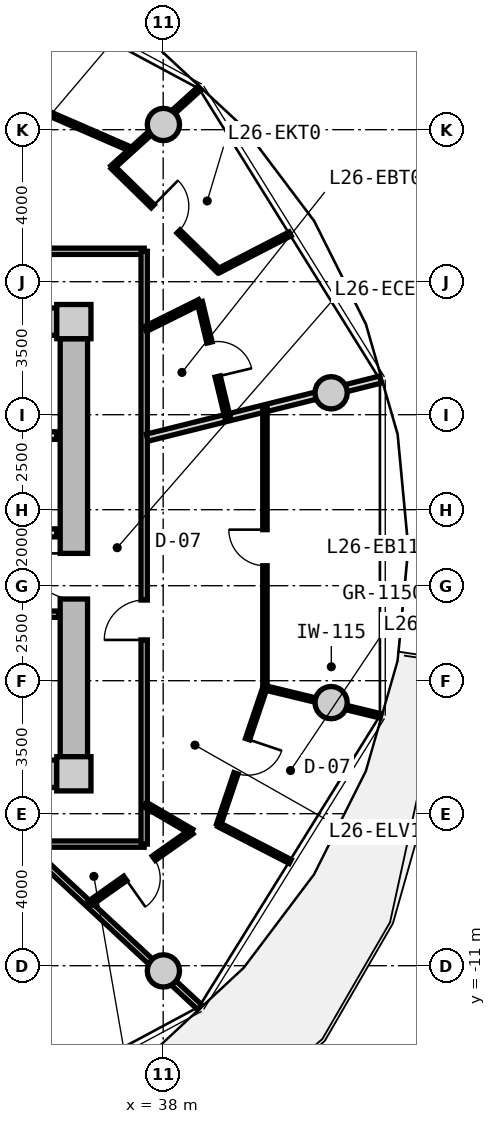
"""IFC4 building model, lengths in metres.
Left out: names, types, materials, properties, quantities, classifications, styles, units other than length and angle.
Written with IfcOpenShell. Run it as: python <this file> out.ifc"""

import sys

from ifc_helpers import new_model, si_unit, direction, frame, frame_2d, origin, origin_2d, place, context, subcontext, project, spatial, rectangle, circle, extrude, source, transform, mapped, element, fill, save


model = new_model("IFC4")
c1 = context("Model", 3, precision=1e-05, world=origin(), true_north=direction((0.0, 1.0)))
c2 = subcontext(c1, "Body", "Model", "MODEL_VIEW")
j1 = project(units=[si_unit("LENGTHUNIT", "METRE"), si_unit("PLANEANGLEUNIT", "RADIAN")], contexts=[c1])
p1 = place(None, origin())
s1 = spatial("IfcSite", under=j1, at=p1, CompositionType="ELEMENT")
p2 = place(p1, origin())
s2 = spatial("IfcBuilding", under=s1, at=p2, CompositionType="ELEMENT")
p3 = place(p2, frame((0.0, 0.0, 87.1)))
s3 = spatial("IfcBuildingStorey", under=s2, at=p3, CompositionType="ELEMENT", Elevation=87.1)
m1 = source(origin(), c2, "Body", "SweptSolid", [
    extrude(rectangle(XDim=0.9, YDim=0.9, at=origin_2d()), origin(), (0.0, 0.0, 1.0), 3.05),
])
for number, where, z_axis, x_axis in (
    (1, (35.65, -5.95, 0.0), (0.0, 0.0, 1.0), (1.0, 0.0, 0.0)),
    (2, (35.65, 5.95, 0.0), (0.0, 0.0, 1.0), (1.0, 0.0, 0.0)),
):
    element("IfcColumn", number, at=place(p3, frame(where, z_axis=z_axis, x_axis=x_axis)), inside=s3, PredefinedType="COLUMN", context=c2, shape_type="MappedRepresentation", body=[
        mapped(m1, transform((0.0, 0.0, 0.0), x_axis=(1.0, 0.0, 0.0), y_axis=(0.0, 1.0, 0.0), z_axis=(0.0, 0.0, 1.0), scale=1.0)),
    ])
m2 = source(origin(), c2, "Body", "SweptSolid", [
    extrude(rectangle(XDim=14.4, YDim=0.72, at=frame_2d((7.2, 0.0))), origin(), (0.0, 0.0, 1.0), 2.79),
])
for number, where, z_axis, x_axis in (
    (3, (20.8, 5.95, 0.0), (0.0, 0.0, 1.0), (1.0, 0.0, 0.0)),
    (4, (35.2, -5.95, 0.0), (0.0, 0.0, 1.0), (-1.0, 0.0, 0.0)),
):
    element("IfcWall", number, at=place(p3, frame(where, z_axis=z_axis, x_axis=x_axis)), inside=s3, PredefinedType="SHEAR", context=c2, shape_type="MappedRepresentation", body=[
        mapped(m2, transform((0.0, 0.0, 0.0), x_axis=(1.0, 0.0, 0.0), y_axis=(0.0, 1.0, 0.0), z_axis=(0.0, 0.0, 1.0), scale=1.0)),
    ])
m3 = source(origin(), c2, "Body", "SweptSolid", [
    extrude(rectangle(XDim=11.0, YDim=0.72, at=frame_2d((5.5, 0.0))), origin(), (0.0, 0.0, 1.0), 2.79),
])
p4 = place(p3, frame((35.65, 5.5, 0.0), z_axis=(0.0, 0.0, 1.0), x_axis=(0.0, -1.0, 0.0)))
e5 = element("IfcWall", 5, at=p4, inside=s3, PredefinedType="SHEAR", context=c2, shape_type="MappedRepresentation", body=[
    mapped(m3, transform((0.0, 0.0, 0.0), x_axis=(1.0, 0.0, 0.0), y_axis=(0.0, 1.0, 0.0), z_axis=(0.0, 0.0, 1.0), scale=1.0)),
])
p5 = place(p4, frame((5.65, 0.0, 0.0)))
e6 = element("IfcOpeningElement", 6, at=p5, cuts=e5, PredefinedType="OPENING", context=c2, shape_type="SweptSolid", body=[
    extrude(rectangle(XDim=1.2, YDim=2.15, at=frame_2d((0.6, 1.075))), frame((0.0, 0.37, 0.0), z_axis=(0.0, -1.0, 0.0), x_axis=(1.0, 0.0, 0.0)), (0.0, 0.0, 1.0), 0.74),
])
m4 = source(origin(), c2, "Body", "SweptSolid", [
    extrude(circle(Radius=0.425, at=origin_2d()), origin(), (0.0, 0.0, 1.0), 3.05),
])
for number, where, z_axis, x_axis in (
    (7, (42.419, 4.076, 0.0), (0.0, 0.0, 1.0), (1.0, 0.0, 0.0)),
    (8, (38.006, 11.137, 0.0), (0.0, 0.0, 1.0), (1.0, 0.0, 0.0)),
    (9, (38.006, -11.137, 0.0), (0.0, 0.0, 1.0), (1.0, 0.0, 0.0)),
    (10, (42.419, -4.076, 0.0), (0.0, 0.0, 1.0), (1.0, 0.0, 0.0)),
):
    element("IfcColumn", number, at=place(p3, frame(where, z_axis=z_axis, x_axis=x_axis)), inside=s3, PredefinedType="COLUMN", context=c2, shape_type="MappedRepresentation", body=[
        mapped(m4, transform((0.0, 0.0, 0.0), x_axis=(1.0, 0.0, 0.0), y_axis=(0.0, 1.0, 0.0), z_axis=(0.0, 0.0, 1.0), scale=1.0)),
    ])
m5 = source(origin(), c2, "Body", "SweptSolid", [
    extrude(rectangle(XDim=3.2, YDim=0.2, at=frame_2d((1.6, 0.0))), origin(), (0.0, 0.0, 1.0), 2.775),
])
p6 = place(p3, frame((32.0, 2.95, 0.0), z_axis=(0.0, 0.0, 1.0), x_axis=(1.0, 0.0, 0.0)))
e11 = element("IfcWall", 11, at=p6, inside=s3, PredefinedType="PARTITIONING", context=c2, shape_type="MappedRepresentation", body=[
    mapped(m5, transform((0.0, 0.0, 0.0), x_axis=(1.0, 0.0, 0.0), y_axis=(0.0, 1.0, 0.0), z_axis=(0.0, 0.0, 1.0), scale=1.0)),
])
m6 = source(origin(), c2, "Body", "SweptSolid", [
    extrude(rectangle(XDim=6.66, YDim=0.21, at=frame_2d((3.33, 0.0))), origin(), (0.0, 0.0, 1.0), 2.775),
])
p7 = place(p3, frame((28.54, 0.39, 0.0), z_axis=(0.0, 0.0, 1.0), x_axis=(1.0, 0.0, 0.0)))
e12 = element("IfcWall", 12, at=p7, inside=s3, PredefinedType="PARTITIONING", context=c2, shape_type="MappedRepresentation", body=[
    mapped(m6, transform((0.0, 0.0, 0.0), x_axis=(1.0, 0.0, 0.0), y_axis=(0.0, 1.0, 0.0), z_axis=(0.0, 0.0, 1.0), scale=1.0)),
])
p8 = place(p7, frame((1.0, 0.0, 0.0)))
e13 = element("IfcOpeningElement", 13, at=p8, cuts=e12, PredefinedType="OPENING", context=c2, shape_type="SweptSolid", body=[
    extrude(rectangle(XDim=1.2, YDim=2.15, at=frame_2d((0.6, 1.075))), frame((0.0, 0.115, 0.0), z_axis=(0.0, -1.0, 0.0), x_axis=(1.0, 0.0, 0.0)), (0.0, 0.0, 1.0), 0.23),
])
m7 = source(origin(), c2, "Body", "SweptSolid", [
    extrude(rectangle(XDim=2.7, YDim=0.165, at=frame_2d((1.35, 0.0))), origin(), (0.0, 0.0, 1.0), 2.775),
])
p9 = place(p3, frame((32.55, -1.75, 0.0), z_axis=(0.0, 0.0, 1.0), x_axis=(1.0, 0.0, 0.0)))
e14 = element("IfcWall", 14, at=p9, inside=s3, PredefinedType="PARTITIONING", context=c2, shape_type="MappedRepresentation", body=[
    mapped(m7, transform((0.0, 0.0, 0.0), x_axis=(1.0, 0.0, 0.0), y_axis=(0.0, 1.0, 0.0), z_axis=(0.0, 0.0, 1.0), scale=1.0)),
])
p10 = place(p9, frame((0.222, 0.0, 0.0)))
e15 = element("IfcOpeningElement", 15, at=p10, cuts=e14, PredefinedType="OPENING", context=c2, shape_type="SweptSolid", body=[
    extrude(rectangle(XDim=0.925, YDim=2.1, at=frame_2d((0.462, 1.05))), frame((0.0, 0.093, 0.0), z_axis=(0.0, -1.0, 0.0), x_axis=(1.0, 0.0, 0.0)), (0.0, 0.0, 1.0), 0.185),
])
p11 = place(p9, frame((1.522, 0.0, 0.0)))
e16 = element("IfcOpeningElement", 16, at=p11, cuts=e14, PredefinedType="OPENING", context=c2, shape_type="SweptSolid", body=[
    extrude(rectangle(XDim=0.925, YDim=2.1, at=frame_2d((0.462, 1.05))), frame((0.0, 0.093, 0.0), z_axis=(0.0, -1.0, 0.0), x_axis=(1.0, 0.0, 0.0)), (0.0, 0.0, 1.0), 0.185),
])
m8 = source(origin(), c2, "Body", "SweptSolid", [
    extrude(rectangle(XDim=9.234, YDim=0.165, at=frame_2d((4.617, 0.0))), origin(), (0.0, 0.0, 1.0), 2.775),
])
p12 = place(p3, frame((28.266, 7.8, 0.0), z_axis=(0.0, 0.0, 1.0), x_axis=(1.0, 0.0, 0.0)))
e17 = element("IfcWall", 17, at=p12, inside=s3, PredefinedType="PARTITIONING", context=c2, shape_type="MappedRepresentation", body=[
    mapped(m8, transform((0.0, 0.0, 0.0), x_axis=(1.0, 0.0, 0.0), y_axis=(0.0, 1.0, 0.0), z_axis=(0.0, 0.0, 1.0), scale=1.0)),
])
p13 = place(p12, frame((4.092, 0.0, 0.0)))
e18 = element("IfcOpeningElement", 18, at=p13, cuts=e17, PredefinedType="OPENING", context=c2, shape_type="SweptSolid", body=[
    extrude(rectangle(XDim=1.05, YDim=2.15, at=frame_2d((0.525, 1.075))), frame((0.0, 0.093, 0.0), z_axis=(0.0, -1.0, 0.0), x_axis=(1.0, 0.0, 0.0)), (0.0, 0.0, 1.0), 0.185),
])
m9 = source(origin(), c2, "Body", "SweptSolid", [
    extrude(rectangle(XDim=8.6, YDim=0.165, at=frame_2d((4.3, 0.0))), origin(), (0.0, 0.0, 1.0), 2.775),
])
p14 = place(p3, frame((37.5, -7.8, 0.0), z_axis=(0.0, 0.0, 1.0), x_axis=(-1.0, 0.0, 0.0)))
e19 = element("IfcWall", 19, at=p14, inside=s3, PredefinedType="PARTITIONING", context=c2, shape_type="MappedRepresentation", body=[
    mapped(m9, transform((0.0, 0.0, 0.0), x_axis=(1.0, 0.0, 0.0), y_axis=(0.0, 1.0, 0.0), z_axis=(0.0, 0.0, 1.0), scale=1.0)),
])
m10 = source(origin(), c2, "Body", "SweptSolid", [
    extrude(rectangle(XDim=15.6, YDim=0.165, at=frame_2d((7.8, 0.0))), origin(), (0.0, 0.0, 1.0), 2.775),
])
p15 = place(p3, frame((37.5, 7.8, 0.0), z_axis=(0.0, 0.0, 1.0), x_axis=(0.0, -1.0, 0.0)))
e20 = element("IfcWall", 20, at=p15, inside=s3, PredefinedType="PARTITIONING", context=c2, shape_type="MappedRepresentation", body=[
    mapped(m10, transform((0.0, 0.0, 0.0), x_axis=(1.0, 0.0, 0.0), y_axis=(0.0, 1.0, 0.0), z_axis=(0.0, 0.0, 1.0), scale=1.0)),
])
p16 = place(p15, frame((9.177, 0.0, 0.0)))
e21 = element("IfcOpeningElement", 21, at=p16, cuts=e20, PredefinedType="OPENING", context=c2, shape_type="SweptSolid", body=[
    extrude(rectangle(XDim=1.05, YDim=2.15, at=frame_2d((0.525, 1.075))), frame((0.0, 0.093, 0.0), z_axis=(0.0, -1.0, 0.0), x_axis=(1.0, 0.0, 0.0)), (0.0, 0.0, 1.0), 0.185),
])
m11 = source(origin(), c2, "Body", "SweptSolid", [
    extrude(rectangle(XDim=6.187, YDim=0.165, at=frame_2d((3.093, 0.0))), origin(), (0.0, 0.0, 1.0), 2.275),
])
p17 = place(p3, frame((34.429, -7.88, 0.0), z_axis=(0.0, 0.0, 1.0), x_axis=(0.732501077882, -0.680765870841, 0.0)))
e22 = element("IfcWall", 22, at=p17, inside=s3, PredefinedType="PARTITIONING", context=c2, shape_type="MappedRepresentation", body=[
    mapped(m11, transform((0.0, 0.0, 0.0), x_axis=(1.0, 0.0, 0.0), y_axis=(0.0, 1.0, 0.0), z_axis=(0.0, 0.0, 1.0), scale=1.0)),
])
m12 = source(origin(), c2, "Body", "SweptSolid", [
    extrude(rectangle(XDim=6.331, YDim=0.19, at=frame_2d((3.165, 0.0))), origin(), (0.0, 0.0, 1.0), 2.275),
])
p18 = place(p3, frame((37.58, 2.896, 0.0), z_axis=(0.0, 0.0, 1.0), x_axis=(0.97036440661, 0.241646267062, 0.0)))
e23 = element("IfcWall", 23, at=p18, inside=s3, PredefinedType="PARTITIONING", context=c2, shape_type="MappedRepresentation", body=[
    mapped(m12, transform((0.0, 0.0, 0.0), x_axis=(1.0, 0.0, 0.0), y_axis=(0.0, 1.0, 0.0), z_axis=(0.0, 0.0, 1.0), scale=1.0)),
])
m13 = source(origin(), c2, "Body", "SweptSolid", [
    extrude(rectangle(XDim=7.375, YDim=0.115, at=frame_2d((3.688, 0.0))), origin(), (0.0, 0.0, 1.0), 2.775),
])
p19 = place(p3, frame((40.678, -3.688, 0.0), z_axis=(0.0, 0.0, 1.0), x_axis=(0.0, 1.0, 0.0)))
e24 = element("IfcWall", 24, at=p19, inside=s3, PredefinedType="PARTITIONING", context=c2, shape_type="MappedRepresentation", body=[
    mapped(m13, transform((0.0, 0.0, 0.0), x_axis=(1.0, 0.0, 0.0), y_axis=(0.0, 1.0, 0.0), z_axis=(0.0, 0.0, 1.0), scale=1.0)),
])
p20 = place(p19, frame((3.213, 0.0, 0.0)))
e25 = element("IfcOpeningElement", 25, at=p20, cuts=e24, PredefinedType="OPENING", context=c2, shape_type="SweptSolid", body=[
    extrude(rectangle(XDim=0.95, YDim=2.1, at=frame_2d((0.475, 1.05))), frame((0.0, 0.067, 0.0), z_axis=(0.0, -1.0, 0.0), x_axis=(1.0, 0.0, 0.0)), (0.0, 0.0, 1.0), 0.135),
])
m14 = source(origin(), c2, "Body", "SweptSolid", [
    extrude(rectangle(XDim=3.133, YDim=0.115, at=frame_2d((1.567, 0.0))), origin(), (0.0, 0.0, 1.0), 2.275),
])
p21 = place(p3, frame((40.678, -3.688, 0.0), z_axis=(0.0, 0.0, 1.0), x_axis=(0.971863619682, -0.235544273414, 0.0)))
e26 = element("IfcWall", 26, at=p21, inside=s3, PredefinedType="PARTITIONING", context=c2, shape_type="MappedRepresentation", body=[
    mapped(m14, transform((0.0, 0.0, 0.0), x_axis=(1.0, 0.0, 0.0), y_axis=(0.0, 1.0, 0.0), z_axis=(0.0, 0.0, 1.0), scale=1.0)),
])
m15 = source(origin(), c2, "Body", "SweptSolid", [
    extrude(rectangle(XDim=1.407, YDim=0.14, at=frame_2d((0.704, 0.0))), origin(), (0.0, 0.0, 1.0), 2.775),
])
p22 = place(p3, frame((37.53, -6.762, 0.0), z_axis=(0.0, 0.0, 1.0), x_axis=(0.863539718977, -0.504280828258, 0.0)))
e27 = element("IfcWall", 27, at=p22, inside=s3, PredefinedType="PARTITIONING", context=c2, shape_type="MappedRepresentation", body=[
    mapped(m15, transform((0.0, 0.0, 0.0), x_axis=(1.0, 0.0, 0.0), y_axis=(0.0, 1.0, 0.0), z_axis=(0.0, 0.0, 1.0), scale=1.0)),
])
m16 = source(origin(), c2, "Body", "SweptSolid", [
    extrude(rectangle(XDim=3.347, YDim=0.14, at=frame_2d((1.673, 0.0))), origin(), (0.0, 0.0, 1.0), 2.775),
])
p23 = place(p3, frame((38.745, -7.472, 0.0), z_axis=(0.0, 0.0, 1.0), x_axis=(-0.81705680263, -0.576557179537, 0.0)))
e28 = element("IfcWall", 28, at=p23, inside=s3, PredefinedType="PARTITIONING", context=c2, shape_type="MappedRepresentation", body=[
    mapped(m16, transform((0.0, 0.0, 0.0), x_axis=(1.0, 0.0, 0.0), y_axis=(0.0, 1.0, 0.0), z_axis=(0.0, 0.0, 1.0), scale=1.0)),
])
p24 = place(p23, frame((1.214, 0.0, 0.0)))
e29 = element("IfcOpeningElement", 29, at=p24, cuts=e28, PredefinedType="OPENING", context=c2, shape_type="SweptSolid", body=[
    extrude(rectangle(XDim=0.92, YDim=2.1, at=frame_2d((0.46, 1.05))), frame((0.0, 0.08, 0.0), z_axis=(0.0, -1.0, 0.0), x_axis=(1.0, 0.0, 0.0)), (0.0, 0.0, 1.0), 0.16),
])
m17 = source(origin(), c2, "Body", "SweptSolid", [
    extrude(rectangle(XDim=2.117, YDim=0.115, at=frame_2d((1.059, 0.0))), origin(), (0.0, 0.0, 1.0), 2.775),
])
p25 = place(p3, frame((39.46, -7.289, 0.0), z_axis=(0.0, 0.0, 1.0), x_axis=(0.888941834945, -0.45802010227, 0.0)))
e30 = element("IfcWall", 30, at=p25, inside=s3, PredefinedType="PARTITIONING", context=c2, shape_type="MappedRepresentation", body=[
    mapped(m17, transform((0.0, 0.0, 0.0), x_axis=(1.0, 0.0, 0.0), y_axis=(0.0, 1.0, 0.0), z_axis=(0.0, 0.0, 1.0), scale=1.0)),
])
m18 = source(origin(), c2, "Body", "SweptSolid", [
    extrude(rectangle(XDim=3.801, YDim=0.115, at=frame_2d((1.901, 0.0))), origin(), (0.0, 0.0, 1.0), 2.775),
])
p26 = place(p3, frame((39.46, -7.289, 0.0), z_axis=(0.0, 0.0, 1.0), x_axis=(0.320097904666, 0.947384468644, 0.0)))
e31 = element("IfcWall", 31, at=p26, inside=s3, PredefinedType="PARTITIONING", context=c2, shape_type="MappedRepresentation", body=[
    mapped(m18, transform((0.0, 0.0, 0.0), x_axis=(1.0, 0.0, 0.0), y_axis=(0.0, 1.0, 0.0), z_axis=(0.0, 0.0, 1.0), scale=1.0)),
])
p27 = place(p26, frame((1.426, 0.0, 0.0)))
e32 = element("IfcOpeningElement", 32, at=p27, cuts=e31, PredefinedType="OPENING", context=c2, shape_type="SweptSolid", body=[
    extrude(rectangle(XDim=0.95, YDim=2.1, at=frame_2d((0.475, 1.05))), frame((0.0, 0.067, 0.0), z_axis=(0.0, -1.0, 0.0), x_axis=(1.0, 0.0, 0.0)), (0.0, 0.0, 1.0), 0.135),
])
m19 = source(origin(), c2, "Body", "SweptSolid", [
    extrude(rectangle(XDim=7.938, YDim=0.115, at=frame_2d((3.969, 0.0))), origin(), (0.0, 0.0, 1.0), 2.775),
])
p28 = place(p3, frame((37.164, 10.479, 0.0), z_axis=(0.0, 0.0, 1.0), x_axis=(-0.917052940979, 0.398765474235, 0.0)))
e33 = element("IfcWall", 33, at=p28, inside=s3, PredefinedType="PARTITIONING", context=c2, shape_type="MappedRepresentation", body=[
    mapped(m19, transform((0.0, 0.0, 0.0), x_axis=(1.0, 0.0, 0.0), y_axis=(0.0, 1.0, 0.0), z_axis=(0.0, 0.0, 1.0), scale=1.0)),
])
p29 = place(p28, frame((3.494, 0.0, 0.0)))
e34 = element("IfcOpeningElement", 34, at=p29, cuts=e33, PredefinedType="OPENING", context=c2, shape_type="SweptSolid", body=[
    extrude(rectangle(XDim=0.95, YDim=2.1, at=frame_2d((0.475, 1.05))), frame((0.0, 0.067, 0.0), z_axis=(0.0, -1.0, 0.0), x_axis=(1.0, 0.0, 0.0)), (0.0, 0.0, 1.0), 0.135),
])
m20 = source(origin(), c2, "Body", "SweptSolid", [
    extrude(rectangle(XDim=3.102, YDim=0.115, at=frame_2d((1.551, 0.0))), origin(), (0.0, 0.0, 1.0), 2.275),
])
p30 = place(p3, frame((36.661, 10.01, 0.0), z_axis=(0.0, 0.0, 1.0), x_axis=(0.741263481794, 0.671214161471, 0.0)))
e35 = element("IfcWall", 35, at=p30, inside=s3, PredefinedType="PARTITIONING", context=c2, shape_type="MappedRepresentation", body=[
    mapped(m20, transform((0.0, 0.0, 0.0), x_axis=(1.0, 0.0, 0.0), y_axis=(0.0, 1.0, 0.0), z_axis=(0.0, 0.0, 1.0), scale=1.0)),
])
m21 = source(origin(), c2, "Body", "SweptSolid", [
    extrude(rectangle(XDim=1.6, YDim=0.14, at=frame_2d((0.8, 0.0))), origin(), (0.0, 0.0, 1.0), 2.775),
])
p31 = place(p3, frame((37.53, 5.754, 0.0), z_axis=(0.0, 0.0, 1.0), x_axis=(0.895522919837, 0.445015393044, 0.0)))
e36 = element("IfcWall", 36, at=p31, inside=s3, PredefinedType="PARTITIONING", context=c2, shape_type="MappedRepresentation", body=[
    mapped(m21, transform((0.0, 0.0, 0.0), x_axis=(1.0, 0.0, 0.0), y_axis=(0.0, 1.0, 0.0), z_axis=(0.0, 0.0, 1.0), scale=1.0)),
])
m22 = source(origin(), c2, "Body", "SweptSolid", [
    extrude(rectangle(XDim=3.112, YDim=0.14, at=frame_2d((1.556, 0.0))), origin(), (0.0, 0.0, 1.0), 2.415),
])
p32 = place(p3, frame((38.963, 6.466, 0.0), z_axis=(0.0, 0.0, 1.0), x_axis=(0.233737944029, -0.972299631555, 0.0)))
e37 = element("IfcWall", 37, at=p32, inside=s3, PredefinedType="PARTITIONING", context=c2, shape_type="MappedRepresentation", body=[
    mapped(m22, transform((0.0, 0.0, 0.0), x_axis=(1.0, 0.0, 0.0), y_axis=(0.0, 1.0, 0.0), z_axis=(0.0, 0.0, 1.0), scale=1.0)),
])
p33 = place(p32, frame((1.096, 0.0, 0.0)))
e38 = element("IfcOpeningElement", 38, at=p33, cuts=e37, PredefinedType="OPENING", context=c2, shape_type="SweptSolid", body=[
    extrude(rectangle(XDim=0.92, YDim=2.1, at=frame_2d((0.46, 1.05))), frame((0.0, 0.08, 0.0), z_axis=(0.0, -1.0, 0.0), x_axis=(1.0, 0.0, 0.0)), (0.0, 0.0, 1.0), 0.16),
])
p34 = place(p3, frame((39.46, 7.289, 0.0), z_axis=(0.0, 0.0, 1.0), x_axis=(0.888941834945, 0.45802010227, 0.0)))
e39 = element("IfcWall", 39, at=p34, inside=s3, PredefinedType="PARTITIONING", context=c2, shape_type="MappedRepresentation", body=[
    mapped(m17, transform((0.0, 0.0, 0.0), x_axis=(1.0, 0.0, 0.0), y_axis=(0.0, 1.0, 0.0), z_axis=(0.0, 0.0, 1.0), scale=1.0)),
])
m23 = source(origin(), c2, "Body", "SweptSolid", [
    extrude(rectangle(XDim=3.902, YDim=0.115, at=frame_2d((1.951, 0.0))), origin(), (0.0, 0.0, 1.0), 2.775),
])
p35 = place(p3, frame((39.46, 7.289, 0.0), z_axis=(0.0, 0.0, 1.0), x_axis=(-0.714853061854, 0.699274695637, 0.0)))
e40 = element("IfcWall", 40, at=p35, inside=s3, PredefinedType="PARTITIONING", context=c2, shape_type="MappedRepresentation", body=[
    mapped(m23, transform((0.0, 0.0, 0.0), x_axis=(1.0, 0.0, 0.0), y_axis=(0.0, 1.0, 0.0), z_axis=(0.0, 0.0, 1.0), scale=1.0)),
])
p36 = place(p35, frame((1.476, 0.0, 0.0)))
e41 = element("IfcOpeningElement", 41, at=p36, cuts=e40, PredefinedType="OPENING", context=c2, shape_type="SweptSolid", body=[
    extrude(rectangle(XDim=0.95, YDim=2.1, at=frame_2d((0.475, 1.05))), frame((0.0, 0.067, 0.0), z_axis=(0.0, -1.0, 0.0), x_axis=(1.0, 0.0, 0.0)), (0.0, 0.0, 1.0), 0.135),
])
m24 = source(origin(), c2, "Body", "SweptSolid", [
    extrude(rectangle(XDim=1.2, YDim=2.15, at=frame_2d((0.6, 1.075))), frame((0.0, 0.025, 0.0), z_axis=(0.0, -1.0, 0.0), x_axis=(1.0, 0.0, 0.0)), (0.0, 0.0, 1.0), 0.05),
])
p37 = place(p5, frame((1.2, 0.0, 0.0), z_axis=(0.0, 0.0, 1.0), x_axis=(-1.0, 0.0, 0.0)))
e42 = element("IfcDoor", 42, at=p37, inside=s3, OperationType="SINGLE_SWING_RIGHT", PredefinedType="DOOR", context=c2, shape_type="MappedRepresentation", body=[
    mapped(m24, transform((0.0, 0.0, 0.0), x_axis=(1.0, 0.0, 0.0), y_axis=(0.0, 1.0, 0.0), z_axis=(0.0, 0.0, 1.0), scale=1.0)),
])
fill(e6, e42)
m25 = source(origin(), c2, "Body", "SweptSolid", [
    extrude(rectangle(XDim=1.05, YDim=2.15, at=frame_2d((0.525, 1.075))), frame((0.0, 0.025, 0.0), z_axis=(0.0, -1.0, 0.0), x_axis=(1.0, 0.0, 0.0)), (0.0, 0.0, 1.0), 0.05),
])
p38 = place(p16, frame((1.05, 0.0, 0.0), z_axis=(0.0, 0.0, 1.0), x_axis=(-1.0, 0.0, 0.0)))
e43 = element("IfcDoor", 43, at=p38, inside=s3, OperationType="SINGLE_SWING_LEFT", PredefinedType="DOOR", context=c2, shape_type="MappedRepresentation", body=[
    mapped(m25, transform((0.0, 0.0, 0.0), x_axis=(1.0, 0.0, 0.0), y_axis=(0.0, 1.0, 0.0), z_axis=(0.0, 0.0, 1.0), scale=1.0)),
])
fill(e21, e43)
m26 = source(origin(), c2, "Body", "SweptSolid", [
    extrude(rectangle(XDim=0.92, YDim=2.1, at=frame_2d((0.46, 1.05))), frame((0.0, 0.025, 0.0), z_axis=(0.0, -1.0, 0.0), x_axis=(1.0, 0.0, 0.0)), (0.0, 0.0, 1.0), 0.05),
])
p39 = place(p24, origin())
e44 = element("IfcDoor", 44, at=p39, inside=s3, OperationType="SINGLE_SWING_RIGHT", PredefinedType="DOOR", context=c2, shape_type="MappedRepresentation", body=[
    mapped(m26, transform((0.0, 0.0, 0.0), x_axis=(1.0, 0.0, 0.0), y_axis=(0.0, 1.0, 0.0), z_axis=(0.0, 0.0, 1.0), scale=1.0)),
])
fill(e29, e44)
m27 = source(origin(), c2, "Body", "SweptSolid", [
    extrude(rectangle(XDim=0.95, YDim=2.1, at=frame_2d((0.475, 1.05))), frame((0.0, 0.025, 0.0), z_axis=(0.0, -1.0, 0.0), x_axis=(1.0, 0.0, 0.0)), (0.0, 0.0, 1.0), 0.05),
])
p40 = place(p27, frame((0.95, 0.0, 0.0), z_axis=(0.0, 0.0, 1.0), x_axis=(-1.0, 0.0, 0.0)))
e45 = element("IfcDoor", 45, at=p40, inside=s3, OperationType="SINGLE_SWING_LEFT", PredefinedType="DOOR", context=c2, shape_type="MappedRepresentation", body=[
    mapped(m27, transform((0.0, 0.0, 0.0), x_axis=(1.0, 0.0, 0.0), y_axis=(0.0, 1.0, 0.0), z_axis=(0.0, 0.0, 1.0), scale=1.0)),
])
fill(e32, e45)
p41 = place(p20, origin())
e46 = element("IfcDoor", 46, at=p41, inside=s3, OperationType="SINGLE_SWING_RIGHT", PredefinedType="DOOR", context=c2, shape_type="MappedRepresentation", body=[
    mapped(m27, transform((0.0, 0.0, 0.0), x_axis=(1.0, 0.0, 0.0), y_axis=(0.0, 1.0, 0.0), z_axis=(0.0, 0.0, 1.0), scale=1.0)),
])
fill(e25, e46)
p42 = place(p33, origin())
e47 = element("IfcDoor", 47, at=p42, inside=s3, OperationType="SINGLE_SWING_RIGHT", PredefinedType="DOOR", context=c2, shape_type="MappedRepresentation", body=[
    mapped(m26, transform((0.0, 0.0, 0.0), x_axis=(1.0, 0.0, 0.0), y_axis=(0.0, 1.0, 0.0), z_axis=(0.0, 0.0, 1.0), scale=1.0)),
])
fill(e38, e47)
p43 = place(p36, frame((0.95, 0.0, 0.0), z_axis=(0.0, 0.0, 1.0), x_axis=(-1.0, 0.0, 0.0)))
e48 = element("IfcDoor", 48, at=p43, inside=s3, OperationType="SINGLE_SWING_LEFT", PredefinedType="DOOR", context=c2, shape_type="MappedRepresentation", body=[
    mapped(m27, transform((0.0, 0.0, 0.0), x_axis=(1.0, 0.0, 0.0), y_axis=(0.0, 1.0, 0.0), z_axis=(0.0, 0.0, 1.0), scale=1.0)),
])
fill(e41, e48)
save(model, sys.argv[1])
